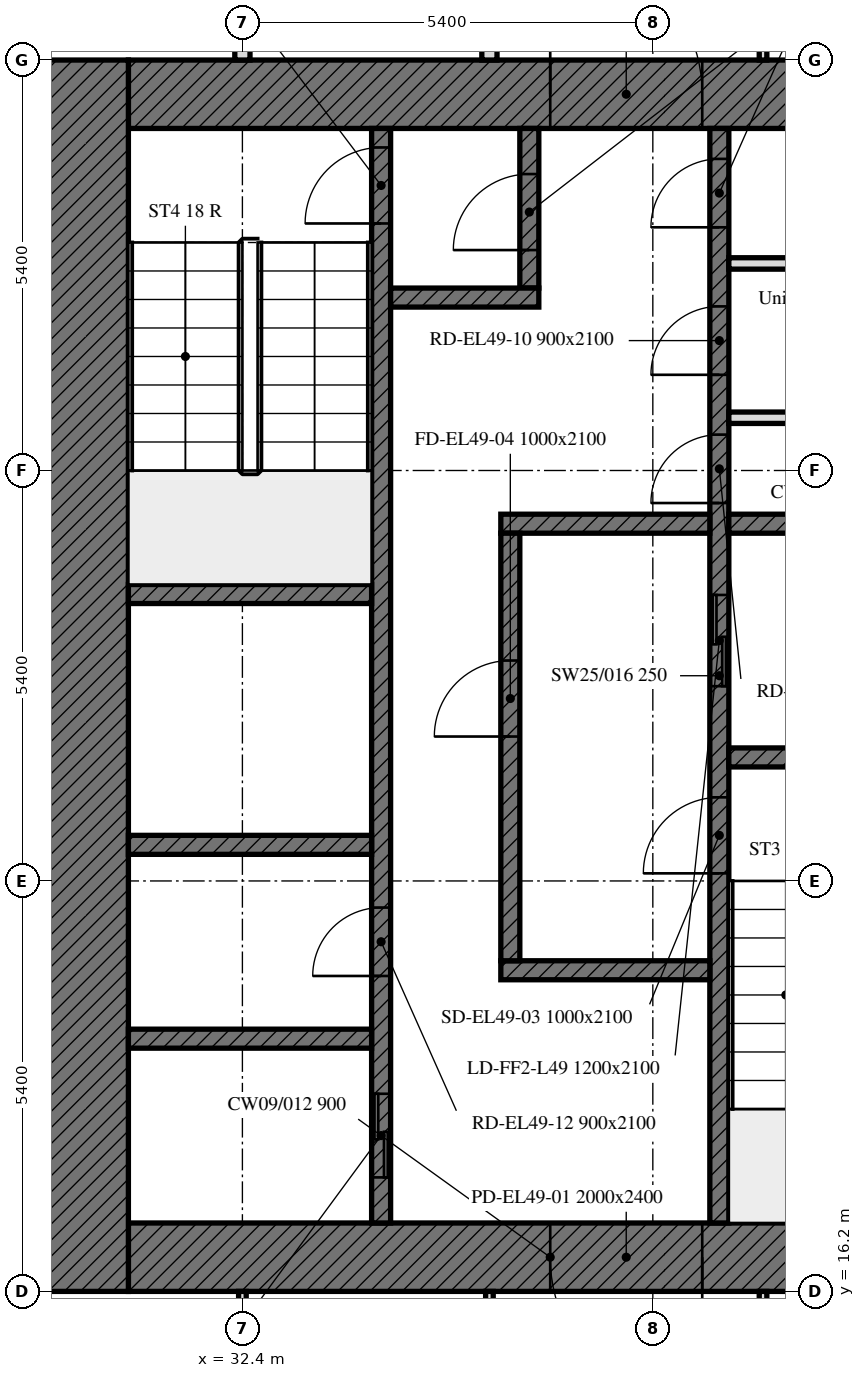
"""IFC4 building model, lengths in metres.
Left out: names, types, materials, properties, quantities, classifications, styles, units other than length and angle.
Written with IfcOpenShell. Run it as: python <this file> out.ifc"""

import sys

from ifc_helpers import new_model, si_unit, direction, frame, frame_2d, origin, place, context, subcontext, project, spatial, rectangle, extrude, element, fill, save


model = new_model("IFC4")
c1 = context("Model", 3, precision=1e-05, world=origin(), true_north=direction((0.0, 1.0)))
c2 = subcontext(c1, "Body", "Model", "MODEL_VIEW")
j1 = project(units=[si_unit("LENGTHUNIT", "METRE"), si_unit("PLANEANGLEUNIT", "RADIAN")], contexts=[c1])
p1 = place(None, origin())
s1 = spatial("IfcSite", under=j1, at=p1, CompositionType="ELEMENT")
p2 = place(p1, origin())
s2 = spatial("IfcBuilding", under=s1, at=p2, CompositionType="ELEMENT")
p3 = place(p2, frame((0.0, 0.0, 200.5)))
s3 = spatial("IfcBuildingStorey", under=s2, at=p3, CompositionType="ELEMENT", Elevation=200.5)
p4 = place(p3, frame((42.0, 16.65, 0.0), z_axis=(0.0, 0.0, 1.0), x_axis=(-1.0, 0.0, 0.0)))
e1 = element("IfcWall", 1, at=p4, inside=s3, PredefinedType="SOLIDWALL", context=c2, shape_type="SweptSolid", body=[
    extrude(rectangle(XDim=11.1, YDim=0.9, at=frame_2d((5.55, 0.0))), origin(), (0.0, 0.0, 1.0), 3.0),
])
p5 = place(p4, frame((3.55, 0.0, 0.0)))
e2 = element("IfcOpeningElement", 2, at=p5, cuts=e1, PredefinedType="OPENING", context=c2, shape_type="SweptSolid", body=[
    extrude(rectangle(XDim=2.0, YDim=2.4, at=frame_2d((1.0, 1.2))), frame((0.0, 0.45, 0.0), z_axis=(0.0, -1.0, 0.0), x_axis=(1.0, 0.0, 0.0)), (0.0, 0.0, 1.0), 0.9),
])
p6 = place(p3, frame((30.9, 31.95, 0.0), z_axis=(0.0, 0.0, 1.0), x_axis=(1.0, 0.0, 0.0)))
e3 = element("IfcWall", 3, at=p6, inside=s3, PredefinedType="SOLIDWALL", context=c2, shape_type="SweptSolid", body=[
    extrude(rectangle(XDim=11.1, YDim=0.9, at=frame_2d((5.55, 0.0))), origin(), (0.0, 0.0, 1.0), 3.0),
])
p7 = place(p6, frame((5.55, 0.0, 0.0)))
e4 = element("IfcOpeningElement", 4, at=p7, cuts=e3, PredefinedType="OPENING", context=c2, shape_type="SweptSolid", body=[
    extrude(rectangle(XDim=2.0, YDim=2.4, at=frame_2d((1.0, 1.2))), frame((0.0, 0.45, 0.0), z_axis=(0.0, -1.0, 0.0), x_axis=(1.0, 0.0, 0.0)), (0.0, 0.0, 1.0), 0.9),
])
p8 = place(p3, frame((30.3, 16.2, 0.0), z_axis=(0.0, 0.0, 1.0), x_axis=(0.0, 1.0, 0.0)))
e5 = element("IfcWall", 5, at=p8, inside=s3, PredefinedType="SOLIDWALL", context=c2, shape_type="SweptSolid", body=[
    extrude(rectangle(XDim=16.2, YDim=1.2, at=frame_2d((8.1, 0.0))), origin(), (0.0, 0.0, 1.0), 3.0),
])
p9 = place(p3, frame((38.675, 17.1, 0.0), z_axis=(0.0, 0.0, 1.0), x_axis=(0.0, 1.0, 0.0)))
e6 = element("IfcWall", 6, at=p9, inside=s3, PredefinedType="SOLIDWALL", context=c2, shape_type="SweptSolid", body=[
    extrude(rectangle(XDim=14.4, YDim=0.25, at=frame_2d((7.2, 0.0))), origin(), (0.0, 0.0, 1.0), 3.0),
])
p10 = place(p9, frame((4.6, 0.0, 0.0)))
e7 = element("IfcOpeningElement", 7, at=p10, cuts=e6, PredefinedType="OPENING", context=c2, shape_type="SweptSolid", body=[
    extrude(rectangle(XDim=1.0, YDim=2.1, at=frame_2d((0.5, 1.05))), frame((0.0, 0.125, 0.0), z_axis=(0.0, -1.0, 0.0), x_axis=(1.0, 0.0, 0.0)), (0.0, 0.0, 1.0), 0.25),
])
p11 = place(p9, frame((7.062, 0.0, 0.0)))
e8 = element("IfcOpeningElement", 8, at=p11, cuts=e6, PredefinedType="OPENING", context=c2, shape_type="SweptSolid", body=[
    extrude(rectangle(XDim=1.2, YDim=2.1, at=frame_2d((0.6, 1.05))), frame((0.0, 0.125, 0.0), z_axis=(0.0, -1.0, 0.0), x_axis=(1.0, 0.0, 0.0)), (0.0, 0.0, 1.0), 0.25),
])
p12 = place(p9, frame((9.472, 0.0, 0.0)))
e9 = element("IfcOpeningElement", 9, at=p12, cuts=e6, PredefinedType="OPENING", context=c2, shape_type="SweptSolid", body=[
    extrude(rectangle(XDim=0.9, YDim=2.1, at=frame_2d((0.45, 1.05))), frame((0.0, 0.125, 0.0), z_axis=(0.0, -1.0, 0.0), x_axis=(1.0, 0.0, 0.0)), (0.0, 0.0, 1.0), 0.25),
])
p13 = place(p9, frame((11.159, 0.0, 0.0)))
e10 = element("IfcOpeningElement", 10, at=p13, cuts=e6, PredefinedType="OPENING", context=c2, shape_type="SweptSolid", body=[
    extrude(rectangle(XDim=0.9, YDim=2.1, at=frame_2d((0.45, 1.05))), frame((0.0, 0.125, 0.0), z_axis=(0.0, -1.0, 0.0), x_axis=(1.0, 0.0, 0.0)), (0.0, 0.0, 1.0), 0.25),
])
p14 = place(p9, frame((13.1, 0.0, 0.0)))
e11 = element("IfcOpeningElement", 11, at=p14, cuts=e6, PredefinedType="OPENING", context=c2, shape_type="SweptSolid", body=[
    extrude(rectangle(XDim=0.9, YDim=2.1, at=frame_2d((0.45, 1.05))), frame((0.0, 0.125, 0.0), z_axis=(0.0, -1.0, 0.0), x_axis=(1.0, 0.0, 0.0)), (0.0, 0.0, 1.0), 0.25),
])
p15 = place(p3, frame((34.225, 17.1, 0.0), z_axis=(0.0, 0.0, 1.0), x_axis=(0.0, 1.0, 0.0)))
e12 = element("IfcWall", 12, at=p15, inside=s3, PredefinedType="SOLIDWALL", context=c2, shape_type="SweptSolid", body=[
    extrude(rectangle(XDim=14.4, YDim=0.25, at=frame_2d((7.2, 0.0))), origin(), (0.0, 0.0, 1.0), 3.0),
])
p16 = place(p15, frame((13.15, 0.0, 0.0)))
e13 = element("IfcOpeningElement", 13, at=p16, cuts=e12, PredefinedType="OPENING", context=c2, shape_type="SweptSolid", body=[
    extrude(rectangle(XDim=1.0, YDim=2.1, at=frame_2d((0.5, 1.05))), frame((0.0, 0.125, 0.0), z_axis=(0.0, -1.0, 0.0), x_axis=(1.0, 0.0, 0.0)), (0.0, 0.0, 1.0), 0.25),
])
p17 = place(p15, frame((0.6, 0.0, 0.0)))
e14 = element("IfcOpeningElement", 14, at=p17, cuts=e12, PredefinedType="OPENING", context=c2, shape_type="SweptSolid", body=[
    extrude(rectangle(XDim=1.1, YDim=2.1, at=frame_2d((0.55, 1.05))), frame((0.0, 0.125, 0.0), z_axis=(0.0, -1.0, 0.0), x_axis=(1.0, 0.0, 0.0)), (0.0, 0.0, 1.0), 0.25),
])
p18 = place(p15, frame((3.25, 0.0, 0.0)))
e15 = element("IfcOpeningElement", 15, at=p18, cuts=e12, PredefinedType="OPENING", context=c2, shape_type="SweptSolid", body=[
    extrude(rectangle(XDim=0.9, YDim=2.1, at=frame_2d((0.45, 1.05))), frame((0.0, 0.125, 0.0), z_axis=(0.0, -1.0, 0.0), x_axis=(1.0, 0.0, 0.0)), (0.0, 0.0, 1.0), 0.25),
])
p19 = place(p3, frame((38.8, 23.225, 0.0), z_axis=(0.0, 0.0, 1.0), x_axis=(1.0, 0.0, 0.0)))
e16 = element("IfcWall", 16, at=p19, inside=s3, PredefinedType="SOLIDWALL", context=c2, shape_type="SweptSolid", body=[
    extrude(rectangle(XDim=3.2, YDim=0.25, at=frame_2d((1.6, 0.0))), origin(), (0.0, 0.0, 1.0), 3.0),
])
for number, where, z_axis, x_axis in (
    (17, (30.9, 25.375, 0.0), (0.0, 0.0, 1.0), (1.0, 0.0, 0.0)),
    (18, (30.9, 22.075, 0.0), (0.0, 0.0, 1.0), (1.0, 0.0, 0.0)),
):
    element("IfcWall", number, at=place(p3, frame(where, z_axis=z_axis, x_axis=x_axis)), inside=s3, PredefinedType="SOLIDWALL", context=c2, shape_type="SweptSolid", body=[
        extrude(rectangle(XDim=3.2, YDim=0.25, at=frame_2d((1.6, 0.0))), origin(), (0.0, 0.0, 1.0), 3.0),
    ])
p20 = place(p3, frame((38.8, 26.3, 0.0), z_axis=(0.0, 0.0, 1.0), x_axis=(1.0, 0.0, 0.0)))
e19 = element("IfcWall", 19, at=p20, inside=s3, PredefinedType="SOLIDWALL", context=c2, shape_type="SweptSolid", body=[
    extrude(rectangle(XDim=3.2, YDim=0.25, at=frame_2d((1.6, 0.0))), origin(), (0.0, 0.0, 1.0), 3.0),
])
for number, where, z_axis, x_axis in (
    (20, (35.8, 26.3, 0.0), (0.0, 0.0, 1.0), (1.0, 0.0, 0.0)),
    (21, (35.8, 20.425, 0.0), (0.0, 0.0, 1.0), (1.0, 0.0, 0.0)),
):
    element("IfcWall", number, at=place(p3, frame(where, z_axis=z_axis, x_axis=x_axis)), inside=s3, PredefinedType="SOLIDWALL", context=c2, shape_type="SweptSolid", body=[
        extrude(rectangle(XDim=2.75, YDim=0.25, at=frame_2d((1.375, 0.0))), origin(), (0.0, 0.0, 1.0), 3.0),
    ])
p21 = place(p3, frame((36.175, 29.4, 0.0), z_axis=(0.0, 0.0, 1.0), x_axis=(0.0, 1.0, 0.0)))
e22 = element("IfcWall", 22, at=p21, inside=s3, PredefinedType="SOLIDWALL", context=c2, shape_type="SweptSolid", body=[
    extrude(rectangle(XDim=2.1, YDim=0.25, at=frame_2d((1.05, 0.0))), origin(), (0.0, 0.0, 1.0), 3.0),
])
p22 = place(p21, frame((0.5, 0.0, 0.0)))
e23 = element("IfcOpeningElement", 23, at=p22, cuts=e22, PredefinedType="OPENING", context=c2, shape_type="SweptSolid", body=[
    extrude(rectangle(XDim=1.0, YDim=2.1, at=frame_2d((0.5, 1.05))), frame((0.0, 0.125, 0.0), z_axis=(0.0, -1.0, 0.0), x_axis=(1.0, 0.0, 0.0)), (0.0, 0.0, 1.0), 0.25),
])
p23 = place(p3, frame((34.35, 29.275, 0.0), z_axis=(0.0, 0.0, 1.0), x_axis=(1.0, 0.0, 0.0)))
e24 = element("IfcWall", 24, at=p23, inside=s3, PredefinedType="SOLIDWALL", context=c2, shape_type="SweptSolid", body=[
    extrude(rectangle(XDim=1.95, YDim=0.25, at=frame_2d((0.975, 0.0))), origin(), (0.0, 0.0, 1.0), 3.0),
])
p24 = place(p3, frame((35.925, 20.55, 0.0), z_axis=(0.0, 0.0, 1.0), x_axis=(0.0, 1.0, 0.0)))
e25 = element("IfcWall", 25, at=p24, inside=s3, PredefinedType="SOLIDWALL", context=c2, shape_type="SweptSolid", body=[
    extrude(rectangle(XDim=5.625, YDim=0.25, at=frame_2d((2.812, 0.0))), origin(), (0.0, 0.0, 1.0), 3.0),
])
p25 = place(p24, frame((2.95, 0.0, 0.0)))
e26 = element("IfcOpeningElement", 26, at=p25, cuts=e25, PredefinedType="OPENING", context=c2, shape_type="SweptSolid", body=[
    extrude(rectangle(XDim=1.0, YDim=2.1, at=frame_2d((0.5, 1.05))), frame((0.0, 0.125, 0.0), z_axis=(0.0, -1.0, 0.0), x_axis=(1.0, 0.0, 0.0)), (0.0, 0.0, 1.0), 0.25),
])
p26 = place(p3, frame((30.9, 19.525, 0.0), z_axis=(0.0, 0.0, 1.0), x_axis=(1.0, 0.0, 0.0)))
e27 = element("IfcWall", 27, at=p26, inside=s3, PredefinedType="SOLIDWALL", context=c2, shape_type="SweptSolid", body=[
    extrude(rectangle(XDim=3.2, YDim=0.25, at=frame_2d((1.6, 0.0))), origin(), (0.0, 0.0, 1.0), 3.0),
])
for number, where, z_axis, x_axis in (
    (28, (38.8, 27.694, 0.0), (0.0, 0.0, 1.0), (1.0, 0.0, 0.0)),
    (29, (38.8, 29.724, 0.0), (0.0, 0.0, 1.0), (1.0, 0.0, 0.0)),
):
    element("IfcWall", number, at=place(p3, frame(where, z_axis=z_axis, x_axis=x_axis)), inside=s3, PredefinedType="PARTITIONING", context=c2, shape_type="SweptSolid", body=[
        extrude(rectangle(XDim=3.2, YDim=0.15, at=frame_2d((1.6, 0.0))), origin(), (0.0, 0.0, 1.0), 3.0),
    ])
p27 = place(p3, frame((32.4, 32.4, 0.0), z_axis=(0.0, 0.0, 1.0), x_axis=(0.0, 1.0, 0.0)))
e30 = element("IfcWall", 30, at=p27, inside=s3, PredefinedType="PARTITIONING", context=c2, shape_type="SweptSolid", body=[
    extrude(rectangle(XDim=4.98, YDim=0.2, at=frame_2d((2.49, 0.0))), origin(), (0.0, 0.0, 1.0), 2.4),
])
p28 = place(p3, frame((35.65, 40.6, 0.0), z_axis=(0.0, 0.0, 1.0), x_axis=(0.0, -1.0, 0.0)))
e31 = element("IfcWall", 31, at=p28, inside=s3, PredefinedType="PARTITIONING", context=c2, shape_type="SweptSolid", body=[
    extrude(rectangle(XDim=8.2, YDim=0.2, at=frame_2d((4.1, 0.0))), origin(), (0.0, 0.0, 1.0), 2.4),
])
p29 = place(p3, frame((39.25, 32.4, 0.0), z_axis=(0.0, 0.0, 1.0), x_axis=(0.0, 1.0, 0.0)))
e32 = element("IfcWall", 32, at=p29, inside=s3, PredefinedType="PARTITIONING", context=c2, shape_type="SweptSolid", body=[
    extrude(rectangle(XDim=8.025, YDim=0.1, at=frame_2d((4.013, 0.0))), origin(), (0.0, 0.0, 1.0), 2.4),
])
for number, where, z_axis, x_axis in (
    (33, (32.4, 13.575, 0.0), (0.0, 0.0, 1.0), (0.0, 1.0, 0.0)),
    (34, (35.65, 16.2, 0.0), (0.0, 0.0, 1.0), (0.0, -1.0, 0.0)),
    (35, (39.25, 13.575, 0.0), (0.0, 0.0, 1.0), (0.0, 1.0, 0.0)),
):
    element("IfcWall", number, at=place(p3, frame(where, z_axis=z_axis, x_axis=x_axis)), inside=s3, PredefinedType="PARTITIONING", context=c2, shape_type="SweptSolid", body=[
        extrude(rectangle(XDim=2.625, YDim=0.1, at=frame_2d((1.312, 0.0))), origin(), (0.0, 0.0, 1.0), 3.0),
    ])
p30 = place(p5, origin())
e36 = element("IfcDoor", 36, at=p30, inside=s3, OperationType="DOUBLE_DOOR_SINGLE_SWING", PredefinedType="DOOR", context=c2, shape_type="SweptSolid", body=[
    extrude(rectangle(XDim=2.0, YDim=2.4, at=frame_2d((1.0, 1.2))), frame((0.0, 0.025, 0.0), z_axis=(0.0, -1.0, 0.0), x_axis=(1.0, 0.0, 0.0)), (0.0, 0.0, 1.0), 0.05),
])
fill(e2, e36)
p31 = place(p7, origin())
e37 = element("IfcDoor", 37, at=p31, inside=s3, OperationType="DOUBLE_DOOR_SINGLE_SWING", PredefinedType="DOOR", context=c2, shape_type="SweptSolid", body=[
    extrude(rectangle(XDim=2.0, YDim=2.4, at=frame_2d((1.0, 1.2))), frame((0.0, 0.025, 0.0), z_axis=(0.0, -1.0, 0.0), x_axis=(1.0, 0.0, 0.0)), (0.0, 0.0, 1.0), 0.05),
])
fill(e4, e37)
p32 = place(p10, origin())
e38 = element("IfcDoor", 38, at=p32, inside=s3, OperationType="SINGLE_SWING_LEFT", PredefinedType="DOOR", context=c2, shape_type="SweptSolid", body=[
    extrude(rectangle(XDim=1.0, YDim=2.1, at=frame_2d((0.5, 1.05))), frame((0.0, 0.025, 0.0), z_axis=(0.0, -1.0, 0.0), x_axis=(1.0, 0.0, 0.0)), (0.0, 0.0, 1.0), 0.05),
])
fill(e7, e38)
p33 = place(p25, origin())
e39 = element("IfcDoor", 39, at=p33, inside=s3, OperationType="SINGLE_SWING_LEFT", PredefinedType="DOOR", context=c2, shape_type="SweptSolid", body=[
    extrude(rectangle(XDim=1.0, YDim=2.1, at=frame_2d((0.5, 1.05))), frame((0.0, 0.025, 0.0), z_axis=(0.0, -1.0, 0.0), x_axis=(1.0, 0.0, 0.0)), (0.0, 0.0, 1.0), 0.05),
])
fill(e26, e39)
p34 = place(p16, origin())
e40 = element("IfcDoor", 40, at=p34, inside=s3, OperationType="SINGLE_SWING_LEFT", PredefinedType="DOOR", context=c2, shape_type="SweptSolid", body=[
    extrude(rectangle(XDim=1.0, YDim=2.1, at=frame_2d((0.5, 1.05))), frame((0.0, 0.025, 0.0), z_axis=(0.0, -1.0, 0.0), x_axis=(1.0, 0.0, 0.0)), (0.0, 0.0, 1.0), 0.05),
])
fill(e13, e40)
p35 = place(p22, origin())
e41 = element("IfcDoor", 41, at=p35, inside=s3, OperationType="SINGLE_SWING_LEFT", PredefinedType="DOOR", context=c2, shape_type="SweptSolid", body=[
    extrude(rectangle(XDim=1.0, YDim=2.1, at=frame_2d((0.5, 1.05))), frame((0.0, 0.025, 0.0), z_axis=(0.0, -1.0, 0.0), x_axis=(1.0, 0.0, 0.0)), (0.0, 0.0, 1.0), 0.05),
])
fill(e23, e41)
p36 = place(p11, origin())
e42 = element("IfcDoor", 42, at=p36, inside=s3, OperationType="DOUBLE_DOOR_SLIDING", PredefinedType="DOOR", context=c2, shape_type="SweptSolid", body=[
    extrude(rectangle(XDim=1.2, YDim=2.1, at=frame_2d((0.6, 1.05))), frame((0.0, 0.025, 0.0), z_axis=(0.0, -1.0, 0.0), x_axis=(1.0, 0.0, 0.0)), (0.0, 0.0, 1.0), 0.05),
])
fill(e8, e42)
p37 = place(p17, origin())
e43 = element("IfcDoor", 43, at=p37, inside=s3, OperationType="DOUBLE_DOOR_SLIDING", PredefinedType="DOOR", context=c2, shape_type="SweptSolid", body=[
    extrude(rectangle(XDim=1.1, YDim=2.1, at=frame_2d((0.55, 1.05))), frame((0.0, 0.025, 0.0), z_axis=(0.0, -1.0, 0.0), x_axis=(1.0, 0.0, 0.0)), (0.0, 0.0, 1.0), 0.05),
])
fill(e14, e43)
p38 = place(p12, origin())
e44 = element("IfcDoor", 44, at=p38, inside=s3, OperationType="SINGLE_SWING_LEFT", PredefinedType="DOOR", context=c2, shape_type="SweptSolid", body=[
    extrude(rectangle(XDim=0.9, YDim=2.1, at=frame_2d((0.45, 1.05))), frame((0.0, 0.025, 0.0), z_axis=(0.0, -1.0, 0.0), x_axis=(1.0, 0.0, 0.0)), (0.0, 0.0, 1.0), 0.05),
])
fill(e9, e44)
p39 = place(p13, origin())
e45 = element("IfcDoor", 45, at=p39, inside=s3, OperationType="SINGLE_SWING_LEFT", PredefinedType="DOOR", context=c2, shape_type="SweptSolid", body=[
    extrude(rectangle(XDim=0.9, YDim=2.1, at=frame_2d((0.45, 1.05))), frame((0.0, 0.025, 0.0), z_axis=(0.0, -1.0, 0.0), x_axis=(1.0, 0.0, 0.0)), (0.0, 0.0, 1.0), 0.05),
])
fill(e10, e45)
p40 = place(p14, origin())
e46 = element("IfcDoor", 46, at=p40, inside=s3, OperationType="SINGLE_SWING_LEFT", PredefinedType="DOOR", context=c2, shape_type="SweptSolid", body=[
    extrude(rectangle(XDim=0.9, YDim=2.1, at=frame_2d((0.45, 1.05))), frame((0.0, 0.025, 0.0), z_axis=(0.0, -1.0, 0.0), x_axis=(1.0, 0.0, 0.0)), (0.0, 0.0, 1.0), 0.05),
])
fill(e11, e46)
p41 = place(p18, origin())
e47 = element("IfcDoor", 47, at=p41, inside=s3, OperationType="SINGLE_SWING_LEFT", PredefinedType="DOOR", context=c2, shape_type="SweptSolid", body=[
    extrude(rectangle(XDim=0.9, YDim=2.1, at=frame_2d((0.45, 1.05))), frame((0.0, 0.025, 0.0), z_axis=(0.0, -1.0, 0.0), x_axis=(1.0, 0.0, 0.0)), (0.0, 0.0, 1.0), 0.05),
])
fill(e15, e47)
save(model, sys.argv[1])
